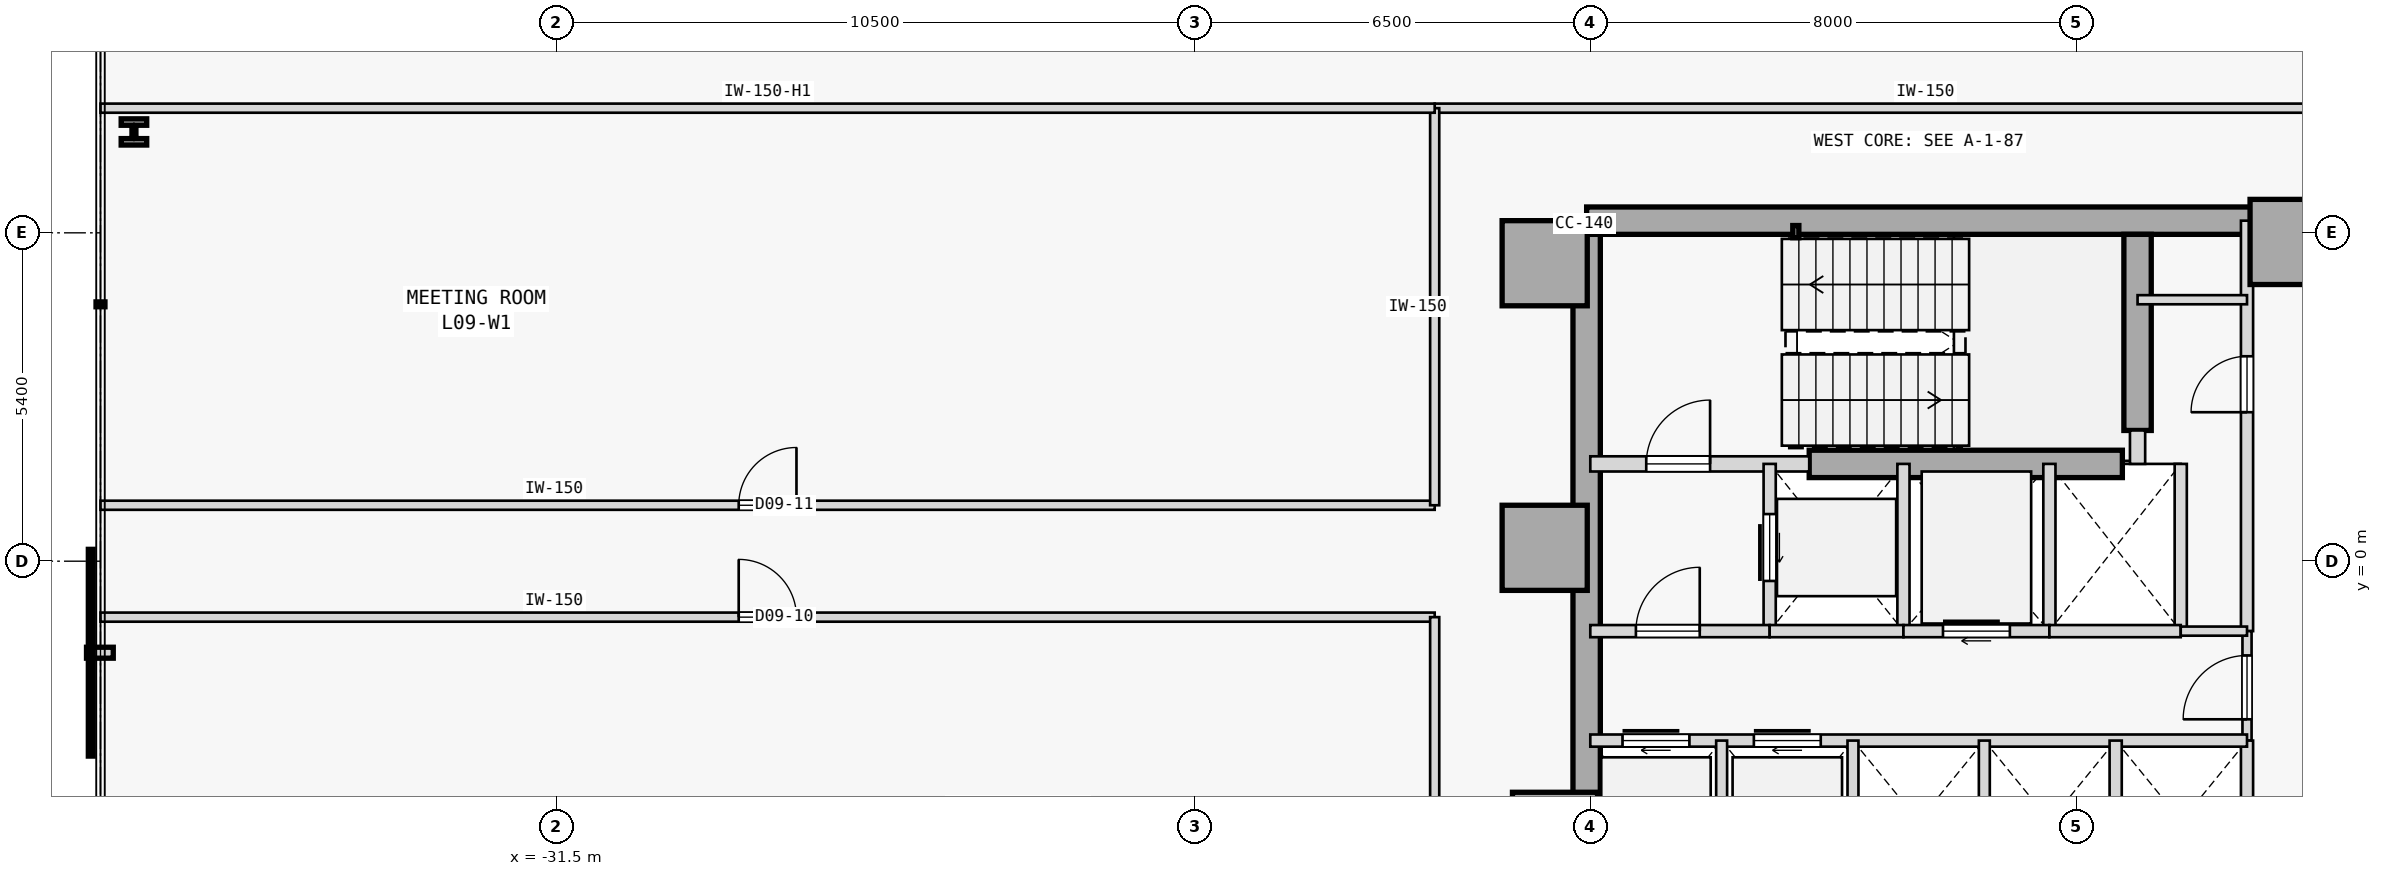
"""IFC4 building model, lengths in metres.
Left out: names, types, materials, properties, quantities, classifications, styles, units other than length and angle.
Written with IfcOpenShell. Run it as: python <this file> out.ifc"""

import sys

from ifc_helpers import new_model, si_unit, direction, frame, frame_2d, origin, origin_2d, place, context, subcontext, project, spatial, rectangle, hollow_rectangle, i_section, extrude, element, fill, save


model = new_model("IFC4")
c1 = context("Model", 3, precision=1e-05, world=origin(), true_north=direction((0.0, 1.0)))
c2 = subcontext(c1, "Body", "Model", "MODEL_VIEW")
j1 = project(units=[si_unit("LENGTHUNIT", "METRE"), si_unit("PLANEANGLEUNIT", "RADIAN")], contexts=[c1])
p1 = place(None, origin())
s1 = spatial("IfcSite", under=j1, at=p1, CompositionType="ELEMENT")
p2 = place(p1, origin())
s2 = spatial("IfcBuilding", under=s1, at=p2, CompositionType="ELEMENT")
p3 = place(p2, frame((0.0, 0.0, 40.8)))
s3 = spatial("IfcBuildingStorey", under=s2, at=p3, CompositionType="ELEMENT", Elevation=40.8)
for number, where, z_axis, x_axis in (
    (1, (-15.25, 4.9, 0.0), (0.0, 0.0, 1.0), (1.0, 0.0, 0.0)),
    (2, (-15.25, 0.22, 0.0), (0.0, 0.0, 1.0), (1.0, 0.0, 0.0)),
    (3, (-15.08, -4.5, 0.0), (0.0, 0.0, 1.0), (1.0, 0.0, 0.0)),
    (4, (-2.95, 5.25, 0.0), (0.0, 0.0, 1.0), (1.0, 0.0, 0.0)),
):
    element("IfcColumn", number, at=place(p3, frame(where, z_axis=z_axis, x_axis=x_axis)), inside=s3, PredefinedType="COLUMN", context=c2, shape_type="SweptSolid", body=[
        extrude(rectangle(XDim=1.4, YDim=1.4, at=origin_2d()), origin(), (0.0, 0.0, 1.0), 3.8),
    ])
p4 = place(p3, frame((-14.56, 5.6, 0.0), z_axis=(0.0, 0.0, 1.0), x_axis=(1.0, 0.0, 0.0)))
e5 = element("IfcWall", 5, at=p4, inside=s3, PredefinedType="SHEAR", context=c2, shape_type="SweptSolid", body=[
    extrude(rectangle(XDim=11.41, YDim=0.45, at=frame_2d((5.705, 0.0))), origin(), (0.0, 0.0, 1.0), 3.575),
])
p5 = place(p3, frame((-14.56, -5.375, 0.0), z_axis=(0.0, 0.0, 1.0), x_axis=(0.0, 1.0, 0.0)))
e6 = element("IfcWall", 6, at=p5, inside=s3, PredefinedType="SHEAR", context=c2, shape_type="SweptSolid", body=[
    extrude(rectangle(XDim=10.75, YDim=0.45, at=frame_2d((5.375, 0.0))), origin(), (0.0, 0.0, 1.0), 3.575),
])
p6 = place(p3, frame((-5.5, 2.15, 0.0), z_axis=(0.0, 0.0, 1.0), x_axis=(0.0, 1.0, 0.0)))
e7 = element("IfcWall", 7, at=p6, inside=s3, PredefinedType="SHEAR", context=c2, shape_type="SweptSolid", body=[
    extrude(rectangle(XDim=3.225, YDim=0.45, at=frame_2d((1.613, 0.0))), origin(), (0.0, 0.0, 1.0), 3.575),
])
p7 = place(p3, frame((-10.9, 1.6, 0.0), z_axis=(0.0, 0.0, 1.0), x_axis=(1.0, 0.0, 0.0)))
e8 = element("IfcWall", 8, at=p7, inside=s3, PredefinedType="SHEAR", context=c2, shape_type="SweptSolid", body=[
    extrude(rectangle(XDim=5.15, YDim=0.45, at=frame_2d((2.575, 0.0))), origin(), (0.0, 0.0, 1.0), 3.575),
])
p8 = place(p3, frame((-11.12, 5.42, 0.0), z_axis=(0.0, 0.0, 1.0), x_axis=(1.0, 0.0, 0.0)))
e9 = element("IfcColumn", 9, at=p8, inside=s3, PredefinedType="COLUMN", context=c2, shape_type="SweptSolid", body=[
    extrude(hollow_rectangle(XDim=0.1, YDim=0.2, WallThickness=0.008, at=origin_2d()), origin(), (0.0, 0.0, 1.0), 3.8),
])
p9 = place(p3, frame((-38.45, 7.059, 0.0), z_axis=(0.0, 0.0, 1.0), x_axis=(1.0, 0.0, 0.0)))
e10 = element("IfcColumn", 10, at=p9, inside=s3, PredefinedType="COLUMN", context=c2, shape_type="SweptSolid", body=[
    extrude(i_section(OverallWidth=0.42, OverallDepth=0.431, WebThickness=0.065, FlangeThickness=0.106, FilletRadius=0.015, at=origin_2d()), origin(), (0.0, 0.0, 1.0), 3.8),
])
p10 = place(p3, frame((-14.5, 1.6, 0.0), z_axis=(0.0, 0.0, 1.0), x_axis=(1.0, 0.0, 0.0)))
e11 = element("IfcWall", 11, at=p10, inside=s3, PredefinedType="STANDARD", context=c2, shape_type="SweptSolid", body=[
    extrude(rectangle(XDim=3.6, YDim=0.25, at=frame_2d((1.8, 0.0))), origin(), (0.0, 0.0, 1.0), 3.575),
])
p11 = place(p10, frame((0.92, 0.0, 0.0)))
e12 = element("IfcOpeningElement", 12, at=p11, cuts=e11, PredefinedType="OPENING", context=c2, shape_type="SweptSolid", body=[
    extrude(rectangle(XDim=1.05, YDim=2.15, at=frame_2d((0.525, 1.075))), frame((0.0, 0.135, 0.0), z_axis=(0.0, -1.0, 0.0), x_axis=(1.0, 0.0, 0.0)), (0.0, 0.0, 1.0), 0.27),
])
p12 = place(p3, frame((-5.5, 1.6, 0.0), z_axis=(0.0, 0.0, 1.0), x_axis=(0.0, 1.0, 0.0)))
e13 = element("IfcWall", 13, at=p12, inside=s3, PredefinedType="STANDARD", context=c2, shape_type="SweptSolid", body=[
    extrude(rectangle(XDim=0.55, YDim=0.25, at=frame_2d((0.275, 0.0))), origin(), (0.0, 0.0, 1.0), 3.575),
])
p13 = place(p3, frame((-3.7, -1.15, 0.0), z_axis=(0.0, 0.0, 1.0), x_axis=(0.0, 1.0, 0.0)))
e14 = element("IfcWall", 14, at=p13, inside=s3, PredefinedType="STANDARD", context=c2, shape_type="SweptSolid", body=[
    extrude(rectangle(XDim=6.75, YDim=0.2, at=frame_2d((3.375, 0.0))), origin(), (0.0, 0.0, 1.0), 3.575),
])
p14 = place(p13, frame((3.6, 0.0, 0.0)))
e15 = element("IfcOpeningElement", 15, at=p14, cuts=e14, PredefinedType="OPENING", context=c2, shape_type="SweptSolid", body=[
    extrude(rectangle(XDim=0.92, YDim=2.15, at=frame_2d((0.46, 1.075))), frame((0.0, 0.11, 0.0), z_axis=(0.0, -1.0, 0.0), x_axis=(1.0, 0.0, 0.0)), (0.0, 0.0, 1.0), 0.22),
])
p15 = place(p3, frame((-3.7, -2.95, 0.0), z_axis=(0.0, 0.0, 1.0), x_axis=(0.0, 1.0, 0.0)))
e16 = element("IfcWall", 16, at=p15, inside=s3, PredefinedType="PARTITIONING", context=c2, shape_type="SweptSolid", body=[
    extrude(rectangle(XDim=1.8, YDim=0.15, at=frame_2d((0.9, 0.0))), origin(), (0.0, 0.0, 1.0), 3.575),
])
p16 = place(p15, frame((0.35, 0.0, 0.0)))
e17 = element("IfcOpeningElement", 17, at=p16, cuts=e16, PredefinedType="OPENING", context=c2, shape_type="SweptSolid", body=[
    extrude(rectangle(XDim=1.05, YDim=2.18, at=frame_2d((0.525, 1.09))), frame((0.0, 0.085, 0.0), z_axis=(0.0, -1.0, 0.0), x_axis=(1.0, 0.0, 0.0)), (0.0, 0.0, 1.0), 0.17),
])
p17 = place(p3, frame((-3.7, -5.6, 0.0), z_axis=(0.0, 0.0, 1.0), x_axis=(0.0, 1.0, 0.0)))
e18 = element("IfcWall", 18, at=p17, inside=s3, PredefinedType="STANDARD", context=c2, shape_type="SweptSolid", body=[
    extrude(rectangle(XDim=2.65, YDim=0.2, at=frame_2d((1.325, 0.0))), origin(), (0.0, 0.0, 1.0), 3.575),
])
p18 = place(p3, frame((-11.55, -1.15, 0.0), z_axis=(0.0, 0.0, 1.0), x_axis=(0.0, 1.0, 0.0)))
e19 = element("IfcWall", 19, at=p18, inside=s3, PredefinedType="STANDARD", context=c2, shape_type="SweptSolid", body=[
    extrude(rectangle(XDim=2.75, YDim=0.2, at=frame_2d((1.375, 0.0))), origin(), (0.0, 0.0, 1.0), 3.575),
])
p19 = place(p18, frame((0.825, 0.0, 0.0)))
e20 = element("IfcOpeningElement", 20, at=p19, cuts=e19, PredefinedType="OPENING", context=c2, shape_type="SweptSolid", body=[
    extrude(rectangle(XDim=1.1, YDim=2.15, at=frame_2d((0.55, 1.075))), frame((0.0, 0.11, 0.0), z_axis=(0.0, -1.0, 0.0), x_axis=(1.0, 0.0, 0.0)), (0.0, 0.0, 1.0), 0.22),
])
p20 = place(p3, frame((-9.35, -1.15, 0.0), z_axis=(0.0, 0.0, 1.0), x_axis=(0.0, 1.0, 0.0)))
e21 = element("IfcWall", 21, at=p20, inside=s3, PredefinedType="STANDARD", context=c2, shape_type="SweptSolid", body=[
    extrude(rectangle(XDim=2.75, YDim=0.2, at=frame_2d((1.375, 0.0))), origin(), (0.0, 0.0, 1.0), 3.575),
])
p21 = place(p3, frame((-14.5, -1.15, 0.0), z_axis=(0.0, 0.0, 1.0), x_axis=(1.0, 0.0, 0.0)))
e22 = element("IfcWall", 22, at=p21, inside=s3, PredefinedType="STANDARD", context=c2, shape_type="SweptSolid", body=[
    extrude(rectangle(XDim=2.95, YDim=0.2, at=frame_2d((1.475, 0.0))), origin(), (0.0, 0.0, 1.0), 3.575),
])
p22 = place(p21, frame((0.75, 0.0, 0.0)))
e23 = element("IfcOpeningElement", 23, at=p22, cuts=e22, PredefinedType="OPENING", context=c2, shape_type="SweptSolid", body=[
    extrude(rectangle(XDim=1.05, YDim=2.18, at=frame_2d((0.525, 1.09))), frame((0.0, 0.11, 0.0), z_axis=(0.0, -1.0, 0.0), x_axis=(1.0, 0.0, 0.0)), (0.0, 0.0, 1.0), 0.22),
])
p23 = place(p3, frame((-11.55, -1.15, 0.0), z_axis=(0.0, 0.0, 1.0), x_axis=(1.0, 0.0, 0.0)))
e24 = element("IfcWall", 24, at=p23, inside=s3, PredefinedType="STANDARD", context=c2, shape_type="SweptSolid", body=[
    extrude(rectangle(XDim=2.2, YDim=0.2, at=frame_2d((1.1, 0.0))), origin(), (0.0, 0.0, 1.0), 3.575),
])
p24 = place(p3, frame((-6.95, -1.15, 0.0), z_axis=(0.0, 0.0, 1.0), x_axis=(0.0, 1.0, 0.0)))
e25 = element("IfcWall", 25, at=p24, inside=s3, PredefinedType="STANDARD", context=c2, shape_type="SweptSolid", body=[
    extrude(rectangle(XDim=2.75, YDim=0.2, at=frame_2d((1.375, 0.0))), origin(), (0.0, 0.0, 1.0), 3.575),
])
p25 = place(p3, frame((-9.35, -1.15, 0.0), z_axis=(0.0, 0.0, 1.0), x_axis=(1.0, 0.0, 0.0)))
e26 = element("IfcWall", 26, at=p25, inside=s3, PredefinedType="STANDARD", context=c2, shape_type="SweptSolid", body=[
    extrude(rectangle(XDim=2.4, YDim=0.2, at=frame_2d((1.2, 0.0))), origin(), (0.0, 0.0, 1.0), 3.575),
])
p26 = place(p25, frame((0.65, 0.0, 0.0)))
e27 = element("IfcOpeningElement", 27, at=p26, cuts=e26, PredefinedType="OPENING", context=c2, shape_type="SweptSolid", body=[
    extrude(rectangle(XDim=1.1, YDim=2.15, at=frame_2d((0.55, 1.075))), frame((0.0, 0.11, 0.0), z_axis=(0.0, -1.0, 0.0), x_axis=(1.0, 0.0, 0.0)), (0.0, 0.0, 1.0), 0.22),
])
p27 = place(p3, frame((-4.79, -1.15, 0.0), z_axis=(0.0, 0.0, 1.0), x_axis=(0.0, 1.0, 0.0)))
e28 = element("IfcWall", 28, at=p27, inside=s3, PredefinedType="STANDARD", context=c2, shape_type="SweptSolid", body=[
    extrude(rectangle(XDim=2.75, YDim=0.2, at=frame_2d((1.375, 0.0))), origin(), (0.0, 0.0, 1.0), 3.575),
])
p28 = place(p3, frame((-6.95, -1.15, 0.0), z_axis=(0.0, 0.0, 1.0), x_axis=(1.0, 0.0, 0.0)))
e29 = element("IfcWall", 29, at=p28, inside=s3, PredefinedType="STANDARD", context=c2, shape_type="SweptSolid", body=[
    extrude(rectangle(XDim=2.16, YDim=0.2, at=frame_2d((1.08, 0.0))), origin(), (0.0, 0.0, 1.0), 3.575),
])
p29 = place(p3, frame((-4.79, -1.15, 0.0), z_axis=(0.0, 0.0, 1.0), x_axis=(1.0, 0.0, 0.0)))
e30 = element("IfcWall", 30, at=p29, inside=s3, PredefinedType="PARTITIONING", context=c2, shape_type="SweptSolid", body=[
    extrude(rectangle(XDim=1.09, YDim=0.15, at=frame_2d((0.545, 0.0))), origin(), (0.0, 0.0, 1.0), 3.575),
])
p30 = place(p3, frame((-14.5, -2.95, 0.0), z_axis=(0.0, 0.0, 1.0), x_axis=(1.0, 0.0, 0.0)))
e31 = element("IfcWall", 31, at=p30, inside=s3, PredefinedType="STANDARD", context=c2, shape_type="SweptSolid", body=[
    extrude(rectangle(XDim=10.8, YDim=0.2, at=frame_2d((5.4, 0.0))), origin(), (0.0, 0.0, 1.0), 3.575),
])
p31 = place(p30, frame((0.53, 0.0, 0.0)))
e32 = element("IfcOpeningElement", 32, at=p31, cuts=e31, PredefinedType="OPENING", context=c2, shape_type="SweptSolid", body=[
    extrude(rectangle(XDim=1.1, YDim=2.15, at=frame_2d((0.55, 1.075))), frame((0.0, 0.11, 0.0), z_axis=(0.0, -1.0, 0.0), x_axis=(1.0, 0.0, 0.0)), (0.0, 0.0, 1.0), 0.22),
])
p32 = place(p30, frame((2.69, 0.0, 0.0)))
e33 = element("IfcOpeningElement", 33, at=p32, cuts=e31, PredefinedType="OPENING", context=c2, shape_type="SweptSolid", body=[
    extrude(rectangle(XDim=1.1, YDim=2.15, at=frame_2d((0.55, 1.075))), frame((0.0, 0.11, 0.0), z_axis=(0.0, -1.0, 0.0), x_axis=(1.0, 0.0, 0.0)), (0.0, 0.0, 1.0), 0.22),
])
p33 = place(p3, frame((-5.86, -5.6, 0.0), z_axis=(0.0, 0.0, 1.0), x_axis=(0.0, 1.0, 0.0)))
e34 = element("IfcWall", 34, at=p33, inside=s3, PredefinedType="STANDARD", context=c2, shape_type="SweptSolid", body=[
    extrude(rectangle(XDim=2.65, YDim=0.2, at=frame_2d((1.325, 0.0))), origin(), (0.0, 0.0, 1.0), 3.575),
])
for number, where, z_axis, x_axis in (
    (35, (-12.34, -5.6, 0.0), (0.0, 0.0, 1.0), (0.0, 1.0, 0.0)),
    (36, (-10.18, -5.6, 0.0), (0.0, 0.0, 1.0), (0.0, 1.0, 0.0)),
    (37, (-8.02, -5.6, 0.0), (0.0, 0.0, 1.0), (0.0, 1.0, 0.0)),
):
    element("IfcWall", number, at=place(p3, frame(where, z_axis=z_axis, x_axis=x_axis)), inside=s3, PredefinedType="STANDARD", context=c2, shape_type="SweptSolid", body=[
        extrude(rectangle(XDim=2.65, YDim=0.18, at=frame_2d((1.325, 0.0))), origin(), (0.0, 0.0, 1.0), 3.575),
    ])
p34 = place(p3, frame((-5.5, 4.3, 0.0), z_axis=(0.0, 0.0, 1.0), x_axis=(1.0, 0.0, 0.0)))
e38 = element("IfcWall", 38, at=p34, inside=s3, PredefinedType="PARTITIONING", context=c2, shape_type="SweptSolid", body=[
    extrude(rectangle(XDim=1.8, YDim=0.15, at=frame_2d((0.9, 0.0))), origin(), (0.0, 0.0, 1.0), 3.575),
])
p35 = place(p3, frame((-17.059, 7.45, 0.0), z_axis=(0.0, 0.0, 1.0), x_axis=(1.0, 0.0, 0.0)))
e39 = element("IfcWall", 39, at=p35, inside=s3, PredefinedType="PARTITIONING", context=c2, shape_type="SweptSolid", body=[
    extrude(rectangle(XDim=16.139, YDim=0.15, at=frame_2d((8.07, 0.0))), origin(), (0.0, 0.0, 1.0), 3.575),
])
p36 = place(p3, frame((-39.0, -0.92, 0.0), z_axis=(0.0, 0.0, 1.0), x_axis=(1.0, 0.0, 0.0)))
e40 = element("IfcWall", 40, at=p36, inside=s3, PredefinedType="PARTITIONING", context=c2, shape_type="SweptSolid", body=[
    extrude(rectangle(XDim=21.941, YDim=0.15, at=frame_2d((10.97, 0.0))), origin(), (0.0, 0.0, 1.0), 3.575),
])
p37 = place(p36, frame((10.496, 0.0, 0.0)))
e41 = element("IfcOpeningElement", 41, at=p37, cuts=e40, PredefinedType="OPENING", context=c2, shape_type="SweptSolid", body=[
    extrude(rectangle(XDim=0.95, YDim=2.15, at=frame_2d((0.475, 1.075))), frame((0.0, 0.085, 0.0), z_axis=(0.0, -1.0, 0.0), x_axis=(1.0, 0.0, 0.0)), (0.0, 0.0, 1.0), 0.17),
])
p38 = place(p3, frame((-17.059, -7.45, 0.0), z_axis=(0.0, 0.0, 1.0), x_axis=(0.0, 1.0, 0.0)))
e42 = element("IfcWall", 42, at=p38, inside=s3, PredefinedType="PARTITIONING", context=c2, shape_type="SweptSolid", body=[
    extrude(rectangle(XDim=6.53, YDim=0.15, at=frame_2d((3.265, 0.0))), origin(), (0.0, 0.0, 1.0), 3.575),
])
p39 = place(p3, frame((-39.0, 0.92, 0.0), z_axis=(0.0, 0.0, 1.0), x_axis=(1.0, 0.0, 0.0)))
e43 = element("IfcWall", 43, at=p39, inside=s3, PredefinedType="PARTITIONING", context=c2, shape_type="SweptSolid", body=[
    extrude(rectangle(XDim=21.941, YDim=0.15, at=frame_2d((10.97, 0.0))), origin(), (0.0, 0.0, 1.0), 3.575),
])
p40 = place(p39, frame((10.496, 0.0, 0.0)))
e44 = element("IfcOpeningElement", 44, at=p40, cuts=e43, PredefinedType="OPENING", context=c2, shape_type="SweptSolid", body=[
    extrude(rectangle(XDim=0.95, YDim=2.15, at=frame_2d((0.475, 1.075))), frame((0.0, 0.085, 0.0), z_axis=(0.0, -1.0, 0.0), x_axis=(1.0, 0.0, 0.0)), (0.0, 0.0, 1.0), 0.17),
])
p41 = place(p3, frame((-17.059, 0.92, 0.0), z_axis=(0.0, 0.0, 1.0), x_axis=(0.0, 1.0, 0.0)))
e45 = element("IfcWall", 45, at=p41, inside=s3, PredefinedType="PARTITIONING", context=c2, shape_type="SweptSolid", body=[
    extrude(rectangle(XDim=6.53, YDim=0.15, at=frame_2d((3.265, 0.0))), origin(), (0.0, 0.0, 1.0), 3.575),
])
p42 = place(p3, frame((-39.0, 7.45, 0.0), z_axis=(0.0, 0.0, 1.0), x_axis=(1.0, 0.0, 0.0)))
e46 = element("IfcWall", 46, at=p42, inside=s3, PredefinedType="PARTITIONING", context=c2, shape_type="SweptSolid", body=[
    extrude(rectangle(XDim=21.941, YDim=0.15, at=frame_2d((10.97, 0.0))), origin(), (0.0, 0.0, 1.0), 3.125),
])
p43 = place(p11, origin())
e47 = element("IfcDoor", 47, at=p43, inside=s3, OperationType="SINGLE_SWING_RIGHT", PredefinedType="DOOR", context=c2, shape_type="SweptSolid", body=[
    extrude(rectangle(XDim=1.05, YDim=2.15, at=frame_2d((0.525, 1.075))), frame((0.0, 0.025, 0.0), z_axis=(0.0, -1.0, 0.0), x_axis=(1.0, 0.0, 0.0)), (0.0, 0.0, 1.0), 0.05),
])
fill(e12, e47)
p44 = place(p22, origin())
e48 = element("IfcDoor", 48, at=p44, inside=s3, OperationType="SINGLE_SWING_RIGHT", PredefinedType="DOOR", context=c2, shape_type="SweptSolid", body=[
    extrude(rectangle(XDim=1.05, YDim=2.18, at=frame_2d((0.525, 1.09))), frame((0.0, 0.025, 0.0), z_axis=(0.0, -1.0, 0.0), x_axis=(1.0, 0.0, 0.0)), (0.0, 0.0, 1.0), 0.05),
])
fill(e23, e48)
p45 = place(p16, origin())
e49 = element("IfcDoor", 49, at=p45, inside=s3, OperationType="SINGLE_SWING_LEFT", PredefinedType="DOOR", context=c2, shape_type="SweptSolid", body=[
    extrude(rectangle(XDim=1.05, YDim=2.18, at=frame_2d((0.525, 1.09))), frame((0.0, 0.025, 0.0), z_axis=(0.0, -1.0, 0.0), x_axis=(1.0, 0.0, 0.0)), (0.0, 0.0, 1.0), 0.05),
])
fill(e17, e49)
p46 = place(p19, origin())
e50 = element("IfcDoor", 50, at=p46, inside=s3, OperationType="SLIDING_TO_RIGHT", PredefinedType="DOOR", context=c2, shape_type="SweptSolid", body=[
    extrude(rectangle(XDim=1.1, YDim=2.15, at=frame_2d((0.55, 1.075))), frame((0.0, 0.025, 0.0), z_axis=(0.0, -1.0, 0.0), x_axis=(1.0, 0.0, 0.0)), (0.0, 0.0, 1.0), 0.05),
])
fill(e20, e50)
p47 = place(p26, origin())
e51 = element("IfcDoor", 51, at=p47, inside=s3, OperationType="SLIDING_TO_RIGHT", PredefinedType="DOOR", context=c2, shape_type="SweptSolid", body=[
    extrude(rectangle(XDim=1.1, YDim=2.15, at=frame_2d((0.55, 1.075))), frame((0.0, 0.025, 0.0), z_axis=(0.0, -1.0, 0.0), x_axis=(1.0, 0.0, 0.0)), (0.0, 0.0, 1.0), 0.05),
])
fill(e27, e51)
p48 = place(p31, origin())
e52 = element("IfcDoor", 52, at=p48, inside=s3, OperationType="SLIDING_TO_RIGHT", PredefinedType="DOOR", context=c2, shape_type="SweptSolid", body=[
    extrude(rectangle(XDim=1.1, YDim=2.15, at=frame_2d((0.55, 1.075))), frame((0.0, 0.025, 0.0), z_axis=(0.0, -1.0, 0.0), x_axis=(1.0, 0.0, 0.0)), (0.0, 0.0, 1.0), 0.05),
])
fill(e32, e52)
p49 = place(p32, origin())
e53 = element("IfcDoor", 53, at=p49, inside=s3, OperationType="SLIDING_TO_RIGHT", PredefinedType="DOOR", context=c2, shape_type="SweptSolid", body=[
    extrude(rectangle(XDim=1.1, YDim=2.15, at=frame_2d((0.55, 1.075))), frame((0.0, 0.025, 0.0), z_axis=(0.0, -1.0, 0.0), x_axis=(1.0, 0.0, 0.0)), (0.0, 0.0, 1.0), 0.05),
])
fill(e33, e53)
p50 = place(p14, origin())
e54 = element("IfcDoor", 54, at=p50, inside=s3, OperationType="SINGLE_SWING_LEFT", PredefinedType="DOOR", context=c2, shape_type="SweptSolid", body=[
    extrude(rectangle(XDim=0.92, YDim=2.15, at=frame_2d((0.46, 1.075))), frame((0.0, 0.025, 0.0), z_axis=(0.0, -1.0, 0.0), x_axis=(1.0, 0.0, 0.0)), (0.0, 0.0, 1.0), 0.05),
])
fill(e15, e54)
p51 = place(p37, origin())
e55 = element("IfcDoor", 55, at=p51, inside=s3, OperationType="SINGLE_SWING_LEFT", PredefinedType="DOOR", context=c2, shape_type="SweptSolid", body=[
    extrude(rectangle(XDim=0.95, YDim=2.15, at=frame_2d((0.475, 1.075))), frame((0.0, 0.025, 0.0), z_axis=(0.0, -1.0, 0.0), x_axis=(1.0, 0.0, 0.0)), (0.0, 0.0, 1.0), 0.05),
])
fill(e41, e55)
p52 = place(p40, origin())
e56 = element("IfcDoor", 56, at=p52, inside=s3, OperationType="SINGLE_SWING_RIGHT", PredefinedType="DOOR", context=c2, shape_type="SweptSolid", body=[
    extrude(rectangle(XDim=0.95, YDim=2.15, at=frame_2d((0.475, 1.075))), frame((0.0, 0.025, 0.0), z_axis=(0.0, -1.0, 0.0), x_axis=(1.0, 0.0, 0.0)), (0.0, 0.0, 1.0), 0.05),
])
fill(e44, e56)
save(model, sys.argv[1])
